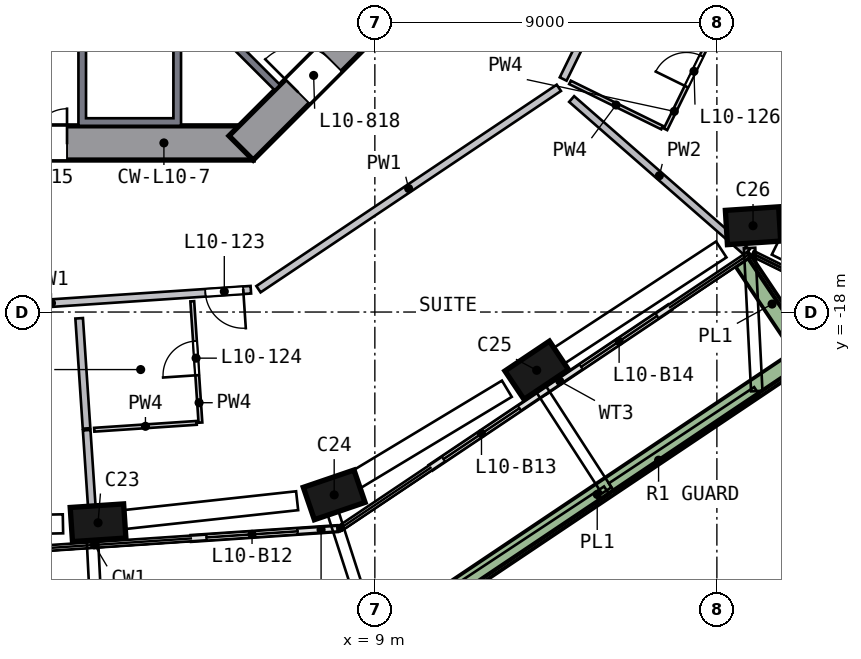
"""IFC4 building model, lengths in metres.
Left out: names, types, materials, properties, quantities, classifications, styles, units other than length and angle.
Written with IfcOpenShell. Run it as: python <this file> out.ifc"""

import sys

from ifc_helpers import new_model, si_unit, direction, frame, frame_2d, origin, origin_2d, place, context, subcontext, project, spatial, polyline, rectangle, outline, extrude, element, fill, save


model = new_model("IFC4")
c1 = context("Model", 3, precision=1e-05, world=origin(), true_north=direction((0.0, 1.0)))
c2 = subcontext(c1, "Body", "Model", "MODEL_VIEW")
j1 = project(units=[si_unit("LENGTHUNIT", "METRE"), si_unit("PLANEANGLEUNIT", "RADIAN")], contexts=[c1])
p1 = place(None, origin())
s1 = spatial("IfcSite", under=j1, at=p1, CompositionType="ELEMENT")
p2 = place(p1, origin())
s2 = spatial("IfcBuilding", under=s1, at=p2, CompositionType="ELEMENT")
p3 = place(p2, frame((0.0, 0.0, 49.5)))
s3 = spatial("IfcBuildingStorey", under=s2, at=p3, CompositionType="ELEMENT", Elevation=49.5)
p4 = place(p3, frame((1.581, -23.555, 0.0), z_axis=(0.112021718, 0.008441555, 0.993669902), x_axis=(0.991458896, 0.066257297, -0.112335337)))
e1 = element("IfcColumn", 1, at=p4, inside=s3, PredefinedType="COLUMN", context=c2, shape_type="SweptSolid", body=[
    extrude(rectangle(XDim=1.4, YDim=0.9, at=origin_2d()), origin(), (0.0, 0.0, 1.0), 3.21),
])
p5 = place(p3, frame((7.799, -22.857, 0.0), z_axis=(0.108415572, 0.038013875, 0.993378583), x_axis=(-0.940181145, -0.320720069, 0.114882776)))
e2 = element("IfcColumn", 2, at=p5, inside=s3, PredefinedType="COLUMN", context=c2, shape_type="SweptSolid", body=[
    extrude(rectangle(XDim=1.4, YDim=0.9, at=origin_2d()), origin(), (0.0, 0.0, 1.0), 3.211),
])
p6 = place(p3, frame((13.147, -19.609, 0.0), z_axis=(0.092706042, 0.063274346, 0.993681009), x_axis=(0.825459696, 0.553189961, -0.112237059)))
e3 = element("IfcColumn", 3, at=p6, inside=s3, PredefinedType="COLUMN", context=c2, shape_type="SweptSolid", body=[
    extrude(rectangle(XDim=1.4, YDim=0.9, at=origin_2d()), origin(), (0.0, 0.0, 1.0), 3.21),
])
p7 = place(p3, frame((18.861, -15.838, 0.0), z_axis=(0.074563781, 0.090297423, 0.993119639), x_axis=(-0.99499079, -0.059759997, 0.080137827)))
e4 = element("IfcColumn", 4, at=p7, inside=s3, PredefinedType="COLUMN", context=c2, shape_type="SweptSolid", body=[
    extrude(rectangle(XDim=1.4, YDim=0.9, at=origin_2d()), origin(), (0.0, 0.0, 1.0), 3.212),
])
p8 = place(p3, frame((-5.799, -13.55, 0.0), z_axis=(0.0, 0.0, 1.0), x_axis=(1.0, 0.0, 0.0)))
e5 = element("IfcWall", 5, at=p8, inside=s3, PredefinedType="SHEAR", context=c2, shape_type="SweptSolid", body=[
    extrude(rectangle(XDim=11.598, YDim=0.9, at=frame_2d((5.799, 0.0))), origin(), (0.0, 0.0, 1.0), 3.5),
])
p9 = place(p8, frame((4.899, 0.0, 0.0)))
e6 = element("IfcOpeningElement", 6, at=p9, cuts=e5, PredefinedType="OPENING", context=c2, shape_type="SweptSolid", body=[
    extrude(rectangle(XDim=1.8, YDim=2.1, at=frame_2d((0.9, 1.05))), frame((0.0, 0.46, 0.0), z_axis=(0.0, -1.0, 0.0), x_axis=(1.0, 0.0, 0.0)), (0.0, 0.0, 1.0), 0.92),
])
p10 = place(p3, frame((5.481, -13.682, 0.0), z_axis=(0.0, 0.0, 1.0), x_axis=(0.707106781, 0.707106781, 0.0)))
e7 = element("IfcWall", 7, at=p10, inside=s3, PredefinedType="SHEAR", context=c2, shape_type="SweptSolid", body=[
    extrude(rectangle(XDim=11.598, YDim=0.9, at=frame_2d((5.799, 0.0))), origin(), (0.0, 0.0, 1.0), 3.5),
])
p11 = place(p10, frame((2.099, 0.0, 0.0)))
e8 = element("IfcOpeningElement", 8, at=p11, cuts=e7, PredefinedType="OPENING", context=c2, shape_type="SweptSolid", body=[
    extrude(rectangle(XDim=1.2, YDim=2.1, at=frame_2d((0.6, 1.05))), frame((0.0, 0.46, 0.0), z_axis=(0.0, -1.0, 0.0), x_axis=(1.0, 0.0, 0.0)), (0.0, 0.0, 1.0), 0.92),
])
p12 = place(p3, frame((4.172, -23.958, 0.0), z_axis=(0.0, 0.0, 1.0), x_axis=(0.997754118, 0.066982983, 0.0)))
e9 = element("IfcWall", 9, at=p12, inside=s3, PredefinedType="SOLIDWALL", context=c2, shape_type="SweptSolid", body=[
    extrude(rectangle(XDim=3.842, YDim=0.15, at=frame_2d((1.921, 0.0))), origin(), (0.0, 0.0, 1.0), 2.425),
])
p13 = place(p12, frame((0.4, 0.0, 0.0)))
e10 = element("IfcOpeningElement", 10, at=p13, cuts=e9, PredefinedType="OPENING", context=c2, shape_type="SweptSolid", body=[
    extrude(rectangle(XDim=2.4, YDim=2.4, at=frame_2d((1.2, 1.2))), frame((0.0, 0.085, 0.0), z_axis=(0.0, -1.0, 0.0), x_axis=(1.0, 0.0, 0.0)), (0.0, 0.0, 1.0), 0.17),
])
p14 = place(p3, frame((10.477, -22.091, 0.0), z_axis=(0.0, 0.0, 1.0), x_axis=(0.830597136, 0.556873772, 0.0)))
e11 = element("IfcWall", 11, at=p14, inside=s3, PredefinedType="SOLIDWALL", context=c2, shape_type="SweptSolid", body=[
    extrude(rectangle(XDim=3.6, YDim=0.15, at=frame_2d((1.8, 0.0))), origin(), (0.0, 0.0, 1.0), 2.425),
])
p15 = place(p14, frame((0.4, 0.0, 0.0)))
e12 = element("IfcOpeningElement", 12, at=p15, cuts=e11, PredefinedType="OPENING", context=c2, shape_type="SweptSolid", body=[
    extrude(rectangle(XDim=2.4, YDim=2.4, at=frame_2d((1.2, 1.2))), frame((0.0, 0.085, 0.0), z_axis=(0.0, -1.0, 0.0), x_axis=(1.0, 0.0, 0.0)), (0.0, 0.0, 1.0), 0.17),
])
p16 = place(p3, frame((13.467, -20.087, 0.0), z_axis=(0.0, 0.0, 1.0), x_axis=(0.830586929, 0.556888995, 0.0)))
e13 = element("IfcWall", 13, at=p16, inside=s3, PredefinedType="SOLIDWALL", context=c2, shape_type="SweptSolid", body=[
    extrude(rectangle(XDim=3.96, YDim=0.15, at=frame_2d((1.98, 0.0))), origin(), (0.0, 0.0, 1.0), 2.425),
])
p17 = place(p16, frame((1.16, 0.0, 0.0)))
e14 = element("IfcOpeningElement", 14, at=p17, cuts=e13, PredefinedType="OPENING", context=c2, shape_type="SweptSolid", body=[
    extrude(rectangle(XDim=2.4, YDim=2.4, at=frame_2d((1.2, 1.2))), frame((0.0, 0.085, 0.0), z_axis=(0.0, -1.0, 0.0), x_axis=(1.0, 0.0, 0.0)), (0.0, 0.0, 1.0), 0.17),
])
p18 = place(p3, frame((9.152, -26.622, 0.0), z_axis=(0.0, 0.0, 1.0), x_axis=(0.830602367, 0.55686597, 0.0)))
e15 = element("IfcWall", 15, at=p18, inside=s3, PredefinedType="SOLIDWALL", context=c2, shape_type="SweptSolid", body=[
    extrude(rectangle(XDim=13.723, YDim=0.5, at=frame_2d((6.862, 0.0))), origin(), (0.0, 0.0, 1.0), 0.7),
])
p19 = place(p3, frame((20.204, -18.911, 0.0), z_axis=(0.0, 0.0, 1.0), x_axis=(-0.556869339, 0.830600108, 0.0)))
e16 = element("IfcWall", 16, at=p19, inside=s3, PredefinedType="SOLIDWALL", context=c2, shape_type="SweptSolid", body=[
    extrude(rectangle(XDim=2.699, YDim=0.5, at=frame_2d((1.35, 0.0))), origin(), (0.0, 0.0, 1.0), 0.7),
])
p20 = place(p3, origin())
e17 = element("IfcWall", 17, at=p20, inside=s3, PredefinedType="SOLIDWALL", context=c2, shape_type="SweptSolid", body=[
    extrude(outline(polyline([(3.9, -10.7), (3.9, -13.1), (1.2, -13.1), (1.2, -10.7), (3.9, -10.7)]), holes=[polyline([(1.4, -12.9), (3.7, -12.9), (3.7, -10.9), (1.4, -10.9), (1.4, -12.9)])]), origin(), (0.0, 0.0, 1.0), 3.19),
])
p21 = place(p3, frame((3.677, -9.334, 0.0), z_axis=(0.0, 0.0, 1.0), x_axis=(0.707106781, -0.707106781, 0.0)))
e18 = element("IfcWall", 18, at=p21, inside=s3, PredefinedType="SOLIDWALL", context=c2, shape_type="SweptSolid", body=[
    extrude(rectangle(XDim=3.9, YDim=0.2, at=frame_2d((1.95, 0.0))), origin(), (0.0, 0.0, 1.0), 3.19),
])
p22 = place(p3, frame((5.737, -17.413, 0.0), z_axis=(0.0, 0.0, 1.0), x_axis=(-0.99775412, -0.066982956, 0.0)))
e19 = element("IfcWall", 19, at=p22, inside=s3, PredefinedType="SOLIDWALL", context=c2, shape_type="SweptSolid", body=[
    extrude(rectangle(XDim=9.116, YDim=0.2, at=frame_2d((4.558, 0.0))), origin(), (0.0, 0.0, 1.0), 3.19),
])
p23 = place(p22, frame((0.2, 0.0, 0.0)))
e20 = element("IfcOpeningElement", 20, at=p23, cuts=e19, PredefinedType="OPENING", context=c2, shape_type="SweptSolid", body=[
    extrude(rectangle(XDim=1.0, YDim=2.1, at=frame_2d((0.5, 1.05))), frame((0.0, 0.11, 0.0), z_axis=(0.0, -1.0, 0.0), x_axis=(1.0, 0.0, 0.0)), (0.0, 0.0, 1.0), 0.22),
])
p24 = place(p3, frame((5.938, -17.399, 0.0), z_axis=(0.0, 0.0, 1.0), x_axis=(0.830586993, 0.5568889, 0.0)))
e21 = element("IfcWall", 21, at=p24, inside=s3, PredefinedType="SOLIDWALL", context=c2, shape_type="SweptSolid", body=[
    extrude(rectangle(XDim=9.516, YDim=0.2, at=frame_2d((4.758, 0.0))), origin(), (0.0, 0.0, 1.0), 3.19),
])
p25 = place(p3, frame((13.955, -11.868, 0.0), z_axis=(0.0, 0.0, 1.0), x_axis=(0.440883583, 0.897564297, 0.0)))
e22 = element("IfcWall", 22, at=p25, inside=s3, PredefinedType="SOLIDWALL", context=c2, shape_type="SweptSolid", body=[
    extrude(rectangle(XDim=3.4, YDim=0.2, at=frame_2d((1.7, 0.0))), origin(), (0.0, 0.0, 1.0), 3.19),
])
p26 = place(p3, frame((30.937, -16.422, 0.0), z_axis=(0.0, 0.0, 1.0), x_axis=(-0.897566554, 0.440878987, 0.0)))
e23 = element("IfcWall", 23, at=p26, inside=s3, PredefinedType="SOLIDWALL", context=c2, shape_type="SweptSolid", body=[
    extrude(rectangle(XDim=17.05, YDim=0.2, at=frame_2d((8.525, 0.0))), origin(), (0.0, 0.0, 1.0), 3.19),
])
p27 = place(p26, frame((9.2, 0.0, 0.0)))
e24 = element("IfcOpeningElement", 24, at=p27, cuts=e23, PredefinedType="OPENING", context=c2, shape_type="SweptSolid", body=[
    extrude(rectangle(XDim=1.0, YDim=2.1, at=frame_2d((0.5, 1.05))), frame((0.0, 0.11, 0.0), z_axis=(0.0, -1.0, 0.0), x_axis=(1.0, 0.0, 0.0)), (0.0, 0.0, 1.0), 0.22),
])
p28 = place(p3, frame((16.424, -6.842, 0.0), z_axis=(0.0, 0.0, 1.0), x_axis=(0.897566707, -0.440878675, 0.0)))
e25 = element("IfcWall", 25, at=p28, inside=s3, PredefinedType="SOLIDWALL", context=c2, shape_type="SweptSolid", body=[
    extrude(rectangle(XDim=17.25, YDim=0.2, at=frame_2d((8.625, 0.0))), origin(), (0.0, 0.0, 1.0), 3.19),
])
p29 = place(p28, frame((4.1, 0.0, 0.0)))
e26 = element("IfcOpeningElement", 26, at=p29, cuts=e25, PredefinedType="OPENING", context=c2, shape_type="SweptSolid", body=[
    extrude(rectangle(XDim=1.0, YDim=2.1, at=frame_2d((0.5, 1.05))), frame((0.0, 0.11, 0.0), z_axis=(0.0, -1.0, 0.0), x_axis=(1.0, 0.0, 0.0)), (0.0, 0.0, 1.0), 0.22),
])
p30 = place(p3, frame((1.219, -18.165, 0.0), z_axis=(0.0, 0.0, 1.0), x_axis=(0.066987599, -0.997753808, 0.0)))
e27 = element("IfcWall", 27, at=p30, inside=s3, PredefinedType="SOLIDWALL", context=c2, shape_type="SweptSolid", body=[
    extrude(rectangle(XDim=2.905, YDim=0.2, at=frame_2d((1.452, 0.0))), origin(), (0.0, 0.0, 1.0), 3.19),
])
p31 = place(p3, frame((1.417, -21.109, 0.0), z_axis=(0.0, 0.0, 1.0), x_axis=(0.066991081, -0.997753574, 0.0)))
e28 = element("IfcWall", 28, at=p31, inside=s3, PredefinedType="SOLIDWALL", context=c2, shape_type="SweptSolid", body=[
    extrude(rectangle(XDim=2.952, YDim=0.2, at=frame_2d((1.476, 0.0))), origin(), (0.0, 0.0, 1.0), 3.19),
])
p32 = place(p3, frame((14.178, -12.395, 0.0), z_axis=(0.0, 0.0, 1.0), x_axis=(0.752877509, -0.658160661, 0.0)))
e29 = element("IfcWall", 29, at=p32, inside=s3, PredefinedType="SOLIDWALL", context=c2, shape_type="SweptSolid", body=[
    extrude(rectangle(XDim=6.132, YDim=0.2, at=frame_2d((3.066, 0.0))), origin(), (0.0, 0.0, 1.0), 3.19),
])
p33 = place(p3, frame((4.311, -20.917, 0.0), z_axis=(0.0, 0.0, 1.0), x_axis=(-0.997753036, -0.066999094, 0.0)))
e30 = element("IfcWall", 30, at=p33, inside=s3, PredefinedType="PARTITIONING", context=c2, shape_type="SweptSolid", body=[
    extrude(rectangle(XDim=2.7, YDim=0.1, at=frame_2d((1.35, 0.0))), origin(), (0.0, 0.0, 1.0), 3.19),
])
p34 = place(p3, frame((4.41, -20.91, 0.0), z_axis=(0.0, 0.0, 1.0), x_axis=(-0.06698486, 0.997753992, 0.0)))
e31 = element("IfcWall", 31, at=p34, inside=s3, PredefinedType="PARTITIONING", context=c2, shape_type="SweptSolid", body=[
    extrude(rectangle(XDim=3.2, YDim=0.1, at=frame_2d((1.6, 0.0))), origin(), (0.0, 0.0, 1.0), 3.19),
])
p35 = place(p34, frame((1.25, 0.0, 0.0)))
e32 = element("IfcOpeningElement", 32, at=p35, cuts=e31, PredefinedType="OPENING", context=c2, shape_type="SweptSolid", body=[
    extrude(rectangle(XDim=0.9, YDim=2.1, at=frame_2d((0.45, 1.05))), frame((0.0, 0.06, 0.0), z_axis=(0.0, -1.0, 0.0), x_axis=(1.0, 0.0, 0.0)), (0.0, 0.0, 1.0), 0.12),
])
p36 = place(p3, frame((16.558, -13.147, 0.0), z_axis=(0.0, 0.0, 1.0), x_axis=(-0.897569392, 0.44087321, 0.0)))
e33 = element("IfcWall", 33, at=p36, inside=s3, PredefinedType="PARTITIONING", context=c2, shape_type="SweptSolid", body=[
    extrude(rectangle(XDim=2.7, YDim=0.1, at=frame_2d((1.35, 0.0))), origin(), (0.0, 0.0, 1.0), 3.19),
])
p37 = place(p3, frame((16.648, -13.191, 0.0), z_axis=(0.0, 0.0, 1.0), x_axis=(0.440915741, 0.8975485, 0.0)))
e34 = element("IfcWall", 34, at=p37, inside=s3, PredefinedType="PARTITIONING", context=c2, shape_type="SweptSolid", body=[
    extrude(rectangle(XDim=3.2, YDim=0.1, at=frame_2d((1.6, 0.0))), origin(), (0.0, 0.0, 1.0), 3.19),
])
p38 = place(p37, frame((1.25, 0.0, 0.0)))
e35 = element("IfcOpeningElement", 35, at=p38, cuts=e34, PredefinedType="OPENING", context=c2, shape_type="SweptSolid", body=[
    extrude(rectangle(XDim=0.9, YDim=2.1, at=frame_2d((0.45, 1.05))), frame((0.0, 0.06, 0.0), z_axis=(0.0, -1.0, 0.0), x_axis=(1.0, 0.0, 0.0)), (0.0, 0.0, 1.0), 0.12),
])
p39 = place(p13, origin())
e36 = element("IfcDoor", 36, at=p39, inside=s3, OperationType="SLIDING_TO_RIGHT", PredefinedType="DOOR", context=c2, shape_type="SweptSolid", body=[
    extrude(rectangle(XDim=2.4, YDim=2.4, at=frame_2d((1.2, 1.2))), frame((0.0, 0.025, 0.0), z_axis=(0.0, -1.0, 0.0), x_axis=(1.0, 0.0, 0.0)), (0.0, 0.0, 1.0), 0.05),
])
fill(e10, e36)
p40 = place(p15, origin())
e37 = element("IfcDoor", 37, at=p40, inside=s3, OperationType="SLIDING_TO_RIGHT", PredefinedType="DOOR", context=c2, shape_type="SweptSolid", body=[
    extrude(rectangle(XDim=2.4, YDim=2.4, at=frame_2d((1.2, 1.2))), frame((0.0, 0.025, 0.0), z_axis=(0.0, -1.0, 0.0), x_axis=(1.0, 0.0, 0.0)), (0.0, 0.0, 1.0), 0.05),
])
fill(e12, e37)
p41 = place(p17, origin())
e38 = element("IfcDoor", 38, at=p41, inside=s3, OperationType="SLIDING_TO_LEFT", PredefinedType="DOOR", context=c2, shape_type="SweptSolid", body=[
    extrude(rectangle(XDim=2.4, YDim=2.4, at=frame_2d((1.2, 1.2))), frame((0.0, 0.025, 0.0), z_axis=(0.0, -1.0, 0.0), x_axis=(1.0, 0.0, 0.0)), (0.0, 0.0, 1.0), 0.05),
])
fill(e14, e38)
p42 = place(p9, origin())
e39 = element("IfcDoor", 39, at=p42, inside=s3, OperationType="DOUBLE_DOOR_SINGLE_SWING", PredefinedType="DOOR", context=c2, shape_type="SweptSolid", body=[
    extrude(rectangle(XDim=1.8, YDim=2.1, at=frame_2d((0.9, 1.05))), frame((0.0, 0.025, 0.0), z_axis=(0.0, -1.0, 0.0), x_axis=(1.0, 0.0, 0.0)), (0.0, 0.0, 1.0), 0.05),
])
fill(e6, e39)
p43 = place(p11, origin())
e40 = element("IfcDoor", 40, at=p43, inside=s3, OperationType="SINGLE_SWING_LEFT", PredefinedType="DOOR", context=c2, shape_type="SweptSolid", body=[
    extrude(rectangle(XDim=1.2, YDim=2.1, at=frame_2d((0.6, 1.05))), frame((0.0, 0.025, 0.0), z_axis=(0.0, -1.0, 0.0), x_axis=(1.0, 0.0, 0.0)), (0.0, 0.0, 1.0), 0.05),
])
fill(e8, e40)
p44 = place(p23, origin())
e41 = element("IfcDoor", 41, at=p44, inside=s3, OperationType="SINGLE_SWING_LEFT", PredefinedType="DOOR", context=c2, shape_type="SweptSolid", body=[
    extrude(rectangle(XDim=1.0, YDim=2.1, at=frame_2d((0.5, 1.05))), frame((0.0, 0.025, 0.0), z_axis=(0.0, -1.0, 0.0), x_axis=(1.0, 0.0, 0.0)), (0.0, 0.0, 1.0), 0.05),
])
fill(e20, e41)
p45 = place(p35, origin())
e42 = element("IfcDoor", 42, at=p45, inside=s3, OperationType="SINGLE_SWING_LEFT", PredefinedType="DOOR", context=c2, shape_type="SweptSolid", body=[
    extrude(rectangle(XDim=0.9, YDim=2.1, at=frame_2d((0.45, 1.05))), frame((0.0, 0.025, 0.0), z_axis=(0.0, -1.0, 0.0), x_axis=(1.0, 0.0, 0.0)), (0.0, 0.0, 1.0), 0.05),
])
fill(e32, e42)
p46 = place(p38, origin())
e43 = element("IfcDoor", 43, at=p46, inside=s3, OperationType="SINGLE_SWING_LEFT", PredefinedType="DOOR", context=c2, shape_type="SweptSolid", body=[
    extrude(rectangle(XDim=0.9, YDim=2.1, at=frame_2d((0.45, 1.05))), frame((0.0, 0.025, 0.0), z_axis=(0.0, -1.0, 0.0), x_axis=(1.0, 0.0, 0.0)), (0.0, 0.0, 1.0), 0.05),
])
fill(e35, e43)
save(model, sys.argv[1])
